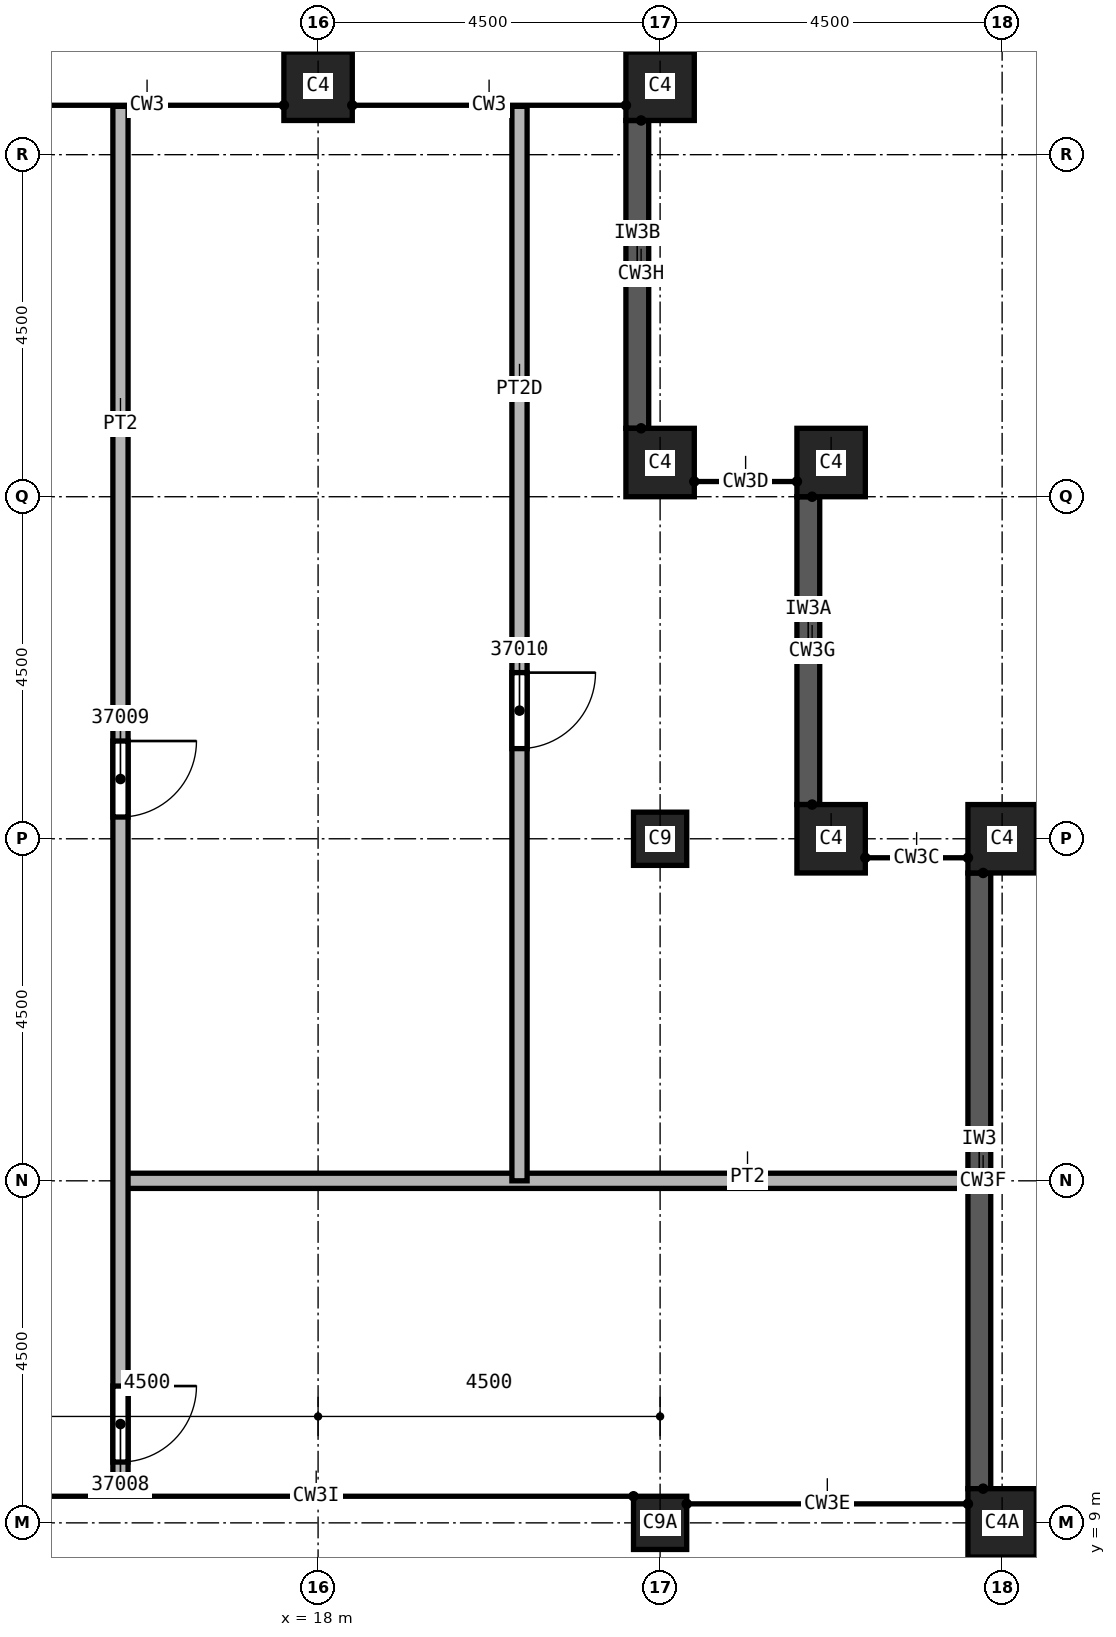
"""IFC4 building model, lengths in metres.
Left out: names, types, materials, properties, quantities, classifications, styles, units other than length and angle.
Written with IfcOpenShell. Run it as: python <this file> out.ifc"""

import sys

from ifc_helpers import new_model, si_unit, direction, frame, frame_2d, origin, origin_2d, place, context, subcontext, project, spatial, polyline, rectangle, outline, extrude, element, fill, save


model = new_model("IFC4")
c1 = context("Model", 3, precision=1e-05, world=origin(), true_north=direction((0.0, 1.0)))
c2 = subcontext(c1, "Body", "Model", "MODEL_VIEW")
j1 = project(units=[si_unit("LENGTHUNIT", "METRE"), si_unit("PLANEANGLEUNIT", "RADIAN")], contexts=[c1])
p1 = place(None, origin())
s1 = spatial("IfcSite", under=j1, at=p1, CompositionType="ELEMENT")
p2 = place(p1, origin())
s2 = spatial("IfcBuilding", under=s1, at=p2, CompositionType="ELEMENT")
p3 = place(p2, frame((0.0, 0.0, 386.0)))
s3 = spatial("IfcBuildingStorey", under=s2, at=p3, CompositionType="ELEMENT", Elevation=386.0)
p4 = place(p3, frame((22.5, 9.0, 0.0), z_axis=(0.0, 0.0, 1.0), x_axis=(1.0, 0.0, 0.0)))
e1 = element("IfcColumn", 1, at=p4, inside=s3, PredefinedType="COLUMN", context=c2, shape_type="SweptSolid", body=[
    extrude(rectangle(XDim=0.7, YDim=0.7, at=origin_2d()), origin(), (0.0, 0.0, 1.0), 2.113),
])
p5 = place(p3, frame((22.5, 18.0, 0.0), z_axis=(0.0, 0.0, 1.0), x_axis=(1.0, 0.0, 0.0)))
e2 = element("IfcColumn", 2, at=p5, inside=s3, PredefinedType="COLUMN", context=c2, shape_type="SweptSolid", body=[
    extrude(rectangle(XDim=0.7, YDim=0.7, at=origin_2d()), origin(), (0.0, 0.0, 1.0), 5.0),
])
p6 = place(p3, frame((27.0, 9.0, 0.0), z_axis=(0.0, 0.0, 1.0), x_axis=(0.0, 1.0, 0.0)))
e3 = element("IfcColumn", 3, at=p6, inside=s3, PredefinedType="COLUMN", context=c2, shape_type="SweptSolid", body=[
    extrude(rectangle(XDim=0.9, YDim=0.9, at=origin_2d()), origin(), (0.0, 0.0, 1.0), 2.113),
])
for number, where, z_axis, x_axis in (
    (4, (27.0, 18.0, 0.0), (0.0, 0.0, 1.0), (0.0, 1.0, 0.0)),
    (5, (18.0, 27.9, 0.0), (0.0, 0.0, 1.0), (1.0, 0.0, 0.0)),
    (6, (22.5, 27.9, 0.0), (0.0, 0.0, 1.0), (1.0, 0.0, 0.0)),
    (7, (22.5, 22.95, 0.0), (0.0, 0.0, 1.0), (1.0, 0.0, 0.0)),
    (8, (24.75, 22.95, 0.0), (0.0, 0.0, 1.0), (1.0, 0.0, 0.0)),
    (9, (24.75, 18.0, 0.0), (0.0, 0.0, 1.0), (1.0, 0.0, 0.0)),
):
    element("IfcColumn", number, at=place(p3, frame(where, z_axis=z_axis, x_axis=x_axis)), inside=s3, PredefinedType="COLUMN", context=c2, shape_type="SweptSolid", body=[
        extrude(rectangle(XDim=0.9, YDim=0.9, at=origin_2d()), origin(), (0.0, 0.0, 1.0), 5.0),
    ])
p7 = place(p3, frame((26.7, 9.45, 2.826), z_axis=(0.0, 0.0, 1.0), x_axis=(0.0, 1.0, 0.0)))
e10 = element("IfcWall", 10, at=p7, inside=s3, PredefinedType="SOLIDWALL", context=c2, shape_type="SweptSolid", body=[
    extrude(outline(polyline([(0.0, 0.0), (8.1, 0.0), (8.1, 3.728), (0.0, 0.05), (0.0, 0.0)])), frame((0.0, 0.15, 0.0), z_axis=(0.0, -1.0, 0.0), x_axis=(1.0, 0.0, 0.0)), (0.0, 0.0, 1.0), 0.3),
])
for number, where, z_axis, x_axis in (
    (11, (24.45, 18.45, 7.02), (0.0, 0.0, 1.0), (0.0, 1.0, 0.0)),
    (12, (22.2, 23.4, 9.326), (0.0, 0.0, 1.0), (0.0, 1.0, 0.0)),
):
    element("IfcWall", number, at=place(p3, frame(where, z_axis=z_axis, x_axis=x_axis)), inside=s3, PredefinedType="SOLIDWALL", context=c2, shape_type="SweptSolid", body=[
        extrude(outline(polyline([(0.0, 0.0), (4.05, 0.0), (4.05, 1.841), (0.0, 0.05), (0.0, 0.0)])), frame((0.0, 0.15, 0.0), z_axis=(0.0, -1.0, 0.0), x_axis=(1.0, 0.0, 0.0)), (0.0, 0.0, 1.0), 0.3),
    ])
p8 = place(p3, frame((15.4, 13.5, 0.0), z_axis=(0.0, 0.0, 1.0), x_axis=(1.0, 0.0, 0.0)))
e13 = element("IfcWall", 13, at=p8, inside=s3, PredefinedType="PARTITIONING", context=c2, shape_type="SweptSolid", body=[
    extrude(rectangle(XDim=11.15, YDim=0.2, at=frame_2d((5.575, 0.0))), origin(), (0.0, 0.0, 1.0), 2.953),
])
p9 = place(p3, frame((15.4, 27.636, 0.0), z_axis=(0.0, 0.0, 1.0), x_axis=(0.0, -1.0, 0.0)))
e14 = element("IfcWall", 14, at=p9, inside=s3, PredefinedType="PARTITIONING", context=c2, shape_type="SweptSolid", body=[
    extrude(rectangle(XDim=18.186, YDim=0.2, at=frame_2d((9.093, 0.0))), origin(), (0.0, 0.0, 1.0), 2.953),
])
p10 = place(p9, frame((16.836, 0.0, 0.0)))
e15 = element("IfcOpeningElement", 15, at=p10, cuts=e14, PredefinedType="OPENING", context=c2, shape_type="SweptSolid", body=[
    extrude(rectangle(XDim=1.0, YDim=2.1, at=frame_2d((0.5, 1.05))), frame((0.0, 0.1, 0.0), z_axis=(0.0, -1.0, 0.0), x_axis=(1.0, 0.0, 0.0)), (0.0, 0.0, 1.0), 0.2),
])
p11 = place(p9, frame((8.35, 0.0, 0.0)))
e16 = element("IfcOpeningElement", 16, at=p11, cuts=e14, PredefinedType="OPENING", context=c2, shape_type="SweptSolid", body=[
    extrude(rectangle(XDim=1.0, YDim=2.1, at=frame_2d((0.5, 1.05))), frame((0.0, 0.1, 0.0), z_axis=(0.0, -1.0, 0.0), x_axis=(1.0, 0.0, 0.0)), (0.0, 0.0, 1.0), 0.2),
])
p12 = place(p3, frame((20.65, 27.636, 0.0), z_axis=(0.0, 0.0, 1.0), x_axis=(0.0, -1.0, 0.0)))
e17 = element("IfcWall", 17, at=p12, inside=s3, PredefinedType="PARTITIONING", context=c2, shape_type="SweptSolid", body=[
    extrude(rectangle(XDim=14.136, YDim=0.2, at=frame_2d((7.068, 0.0))), origin(), (0.0, 0.0, 1.0), 4.84),
])
p13 = place(p12, frame((7.45, 0.0, 0.0)))
e18 = element("IfcOpeningElement", 18, at=p13, cuts=e17, PredefinedType="OPENING", context=c2, shape_type="SweptSolid", body=[
    extrude(rectangle(XDim=1.0, YDim=2.1, at=frame_2d((0.5, 1.05))), frame((0.0, 0.1, 0.0), z_axis=(0.0, -1.0, 0.0), x_axis=(1.0, 0.0, 0.0)), (0.0, 0.0, 1.0), 0.2),
])
p14 = place(p10, origin())
e19 = element("IfcDoor", 19, at=p14, inside=s3, OperationType="SINGLE_SWING_LEFT", PredefinedType="DOOR", context=c2, shape_type="SweptSolid", body=[
    extrude(rectangle(XDim=1.0, YDim=2.1, at=frame_2d((0.5, 1.05))), frame((0.0, 0.025, 0.0), z_axis=(0.0, -1.0, 0.0), x_axis=(1.0, 0.0, 0.0)), (0.0, 0.0, 1.0), 0.05),
])
fill(e15, e19)
p15 = place(p11, origin())
e20 = element("IfcDoor", 20, at=p15, inside=s3, OperationType="SINGLE_SWING_RIGHT", PredefinedType="DOOR", context=c2, shape_type="SweptSolid", body=[
    extrude(rectangle(XDim=1.0, YDim=2.1, at=frame_2d((0.5, 1.05))), frame((0.0, 0.025, 0.0), z_axis=(0.0, -1.0, 0.0), x_axis=(1.0, 0.0, 0.0)), (0.0, 0.0, 1.0), 0.05),
])
fill(e16, e20)
p16 = place(p13, origin())
e21 = element("IfcDoor", 21, at=p16, inside=s3, OperationType="SINGLE_SWING_LEFT", PredefinedType="DOOR", context=c2, shape_type="SweptSolid", body=[
    extrude(rectangle(XDim=1.0, YDim=2.1, at=frame_2d((0.5, 1.05))), frame((0.0, 0.025, 0.0), z_axis=(0.0, -1.0, 0.0), x_axis=(1.0, 0.0, 0.0)), (0.0, 0.0, 1.0), 0.05),
])
fill(e18, e21)
save(model, sys.argv[1])
